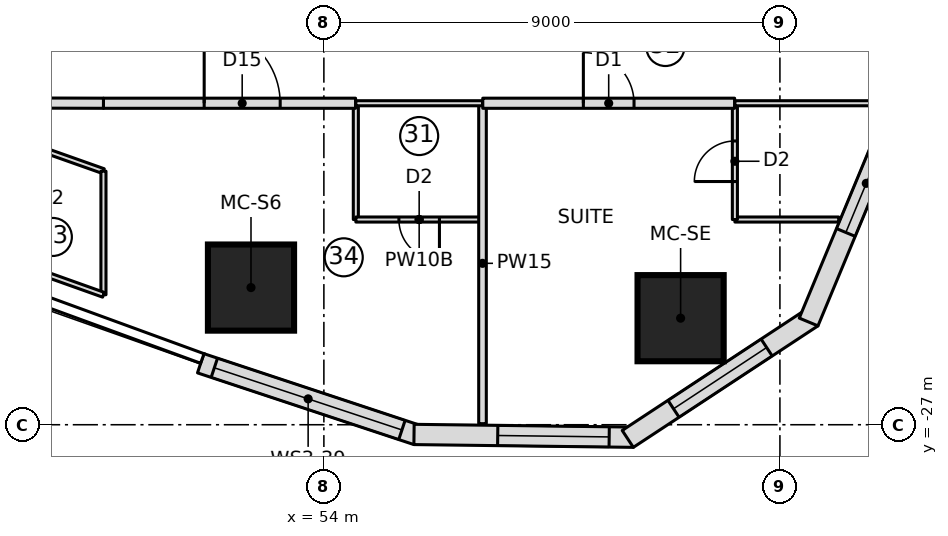
"""IFC4 building model, lengths in metres.
Left out: names, types, materials, properties, quantities, classifications, styles, units other than length and angle.
Written with IfcOpenShell. Run it as: python <this file> out.ifc"""

import sys

from ifc_helpers import new_model, si_unit, direction, frame, frame_2d, origin, origin_2d, place, context, subcontext, project, spatial, polyline, rectangle, outline, extrude, element, fill, save


model = new_model("IFC4")
c1 = context("Model", 3, precision=1e-05, world=origin(), true_north=direction((0.0, 1.0)))
c2 = subcontext(c1, "Body", "Model", "MODEL_VIEW")
j1 = project(units=[si_unit("LENGTHUNIT", "METRE"), si_unit("PLANEANGLEUNIT", "RADIAN")], contexts=[c1])
p1 = place(None, origin())
s1 = spatial("IfcSite", under=j1, at=p1, CompositionType="ELEMENT")
p2 = place(p1, origin())
s2 = spatial("IfcBuilding", under=s1, at=p2, CompositionType="ELEMENT")
p3 = place(p2, frame((0.0, 0.0, 113.3)))
s3 = spatial("IfcBuildingStorey", under=s2, at=p3, CompositionType="ELEMENT", Elevation=113.3)
for number, where, z_axis, x_axis in (
    (1, (52.562, -24.293, 0.0), (0.0, 0.0, 1.0), (1.0, 0.0, 0.0)),
    (2, (61.04, -24.897, 0.0), (0.0, 0.0, 1.0), (1.0, 0.0, 0.0)),
):
    element("IfcColumn", number, at=place(p3, frame(where, z_axis=z_axis, x_axis=x_axis)), inside=s3, PredefinedType="COLUMN", context=c2, shape_type="SweptSolid", body=[
        extrude(rectangle(XDim=1.7, YDim=1.7, at=origin_2d()), origin(), (0.0, 0.0, 1.0), 3.55),
    ])
p4 = place(p3, frame((51.569, -25.787, 0.0), z_axis=(0.0, 0.0, 1.0), x_axis=(0.94925004851, -0.314522408429, 0.0)))
e3 = element("IfcWall", 3, at=p4, inside=s3, PredefinedType="NOTDEFINED", context=c2, shape_type="SweptSolid", body=[
    extrude(outline(polyline([(0.0, -0.2), (4.499, -0.2), (4.437, 0.2), (0.0, 0.2), (0.0, -0.2)])), origin(), (0.0, 0.0, 1.0), 3.25),
])
p5 = place(p4, frame((0.284, 0.0, 0.9)))
e4 = element("IfcOpeningElement", 4, at=p5, cuts=e3, PredefinedType="OPENING", context=c2, shape_type="SweptSolid", body=[
    extrude(rectangle(XDim=3.9, YDim=1.8, at=frame_2d((1.95, 0.9))), frame((0.0, 0.21, 0.0), z_axis=(0.0, -1.0, 0.0), x_axis=(1.0, 0.0, 0.0)), (0.0, 0.0, 1.0), 0.42),
])
p6 = place(p3, frame((55.81, -27.192, 0.0), z_axis=(0.0, 0.0, 1.0), x_axis=(0.999919718849, -0.012671063772, 0.0)))
e5 = element("IfcWall", 5, at=p6, inside=s3, PredefinedType="NOTDEFINED", context=c2, shape_type="SweptSolid", body=[
    extrude(outline(polyline([(-0.031, -0.2), (4.3, -0.2), (4.177, 0.2), (0.031, 0.2), (-0.031, -0.2)])), origin(), (0.0, 0.0, 1.0), 3.25),
])
p7 = place(p6, frame((1.621, 0.0, 0.6)))
e6 = element("IfcOpeningElement", 6, at=p7, cuts=e5, PredefinedType="OPENING", context=c2, shape_type="SweptSolid", body=[
    extrude(outline(polyline([(0.0, 1.35), (0.084, 1.771), (0.322, 2.128), (0.679, 2.366), (1.1, 2.45), (1.521, 2.366), (1.878, 2.128), (2.116, 1.771), (2.2, 1.35), (2.2, 1.1), (2.116, 0.679), (1.878, 0.322), (1.521, 0.084), (1.1, 0.0), (0.679, 0.084), (0.322, 0.322), (0.084, 0.679), (0.0, 1.1), (0.0, 1.35)])), frame((0.0, 0.21, 0.0), z_axis=(0.0, -1.0, 0.0), x_axis=(1.0, 0.0, 0.0)), (0.0, 0.0, 1.0), 0.42),
])
p8 = place(p3, frame((60.049, -27.246, 0.0), z_axis=(0.0, 0.0, 1.0), x_axis=(0.835340523653, 0.549732852887, 0.0)))
e7 = element("IfcWall", 7, at=p8, inside=s3, PredefinedType="NOTDEFINED", context=c2, shape_type="SweptSolid", body=[
    extrude(outline(polyline([(-0.061, -0.2), (4.3, -0.2), (4.178, 0.2), (0.061, 0.2), (-0.061, -0.2)])), origin(), (0.0, 0.0, 1.0), 3.25),
])
p9 = place(p8, frame((1.02, 0.0, 0.6)))
e8 = element("IfcOpeningElement", 8, at=p9, cuts=e7, PredefinedType="OPENING", context=c2, shape_type="SweptSolid", body=[
    extrude(outline(polyline([(0.0, 1.35), (0.084, 1.771), (0.322, 2.128), (0.679, 2.366), (1.1, 2.45), (1.521, 2.366), (1.878, 2.128), (2.116, 1.771), (2.2, 1.35), (2.2, 1.1), (2.116, 0.679), (1.878, 0.322), (1.521, 0.084), (1.1, 0.0), (0.679, 0.084), (0.322, 0.322), (0.084, 0.679), (0.0, 1.1), (0.0, 1.35)])), frame((0.0, 0.21, 0.0), z_axis=(0.0, -1.0, 0.0), x_axis=(1.0, 0.0, 0.0)), (0.0, 0.0, 1.0), 0.42),
])
p10 = place(p3, frame((63.59, -24.916, 0.0), z_axis=(0.0, 0.0, 1.0), x_axis=(0.383997751971, 0.923334027577, 0.0)))
e9 = element("IfcWall", 9, at=p10, inside=s3, PredefinedType="NOTDEFINED", context=c2, shape_type="SweptSolid", body=[
    extrude(outline(polyline([(-0.061, -0.2), (4.27, -0.2), (4.208, 0.2), (0.061, 0.2), (-0.061, -0.2)])), origin(), (0.0, 0.0, 1.0), 3.25),
])
p11 = place(p10, frame((1.852, 0.0, 0.6)))
e10 = element("IfcOpeningElement", 10, at=p11, cuts=e9, PredefinedType="OPENING", context=c2, shape_type="SweptSolid", body=[
    extrude(outline(polyline([(0.0, 1.4), (0.08, 1.802), (0.308, 2.142), (0.648, 2.37), (1.05, 2.45), (1.452, 2.37), (1.792, 2.142), (2.02, 1.802), (2.1, 1.4), (2.1, 1.05), (2.02, 0.648), (1.792, 0.308), (1.452, 0.08), (1.05, 0.0), (0.648, 0.08), (0.308, 0.308), (0.08, 0.648), (0.0, 1.05), (0.0, 1.4)])), frame((0.0, 0.21, 0.0), z_axis=(0.0, -1.0, 0.0), x_axis=(1.0, 0.0, 0.0)), (0.0, 0.0, 1.0), 0.42),
])
p12 = place(p3, frame((54.631, -22.95, 0.0), z_axis=(0.0, 0.0, 1.0), x_axis=(0.0, 1.0, 0.0)))
e11 = element("IfcWall", 11, at=p12, inside=s3, PredefinedType="PARTITIONING", context=c2, shape_type="SweptSolid", body=[
    extrude(rectangle(XDim=2.3, YDim=0.1, at=frame_2d((1.15, 0.0))), origin(), (0.0, 0.0, 1.0), 3.25),
])
p13 = place(p3, frame((57.131, -22.95, 0.0), z_axis=(0.0, 0.0, 1.0), x_axis=(-1.0, 0.0, 0.0)))
e12 = element("IfcWall", 12, at=p13, inside=s3, PredefinedType="PARTITIONING", context=c2, shape_type="SweptSolid", body=[
    extrude(rectangle(XDim=2.5, YDim=0.1, at=frame_2d((1.25, 0.0))), origin(), (0.0, 0.0, 1.0), 3.25),
])
p14 = place(p13, frame((0.85, 0.0, 0.0)))
e13 = element("IfcOpeningElement", 13, at=p14, cuts=e12, PredefinedType="OPENING", context=c2, shape_type="SweptSolid", body=[
    extrude(rectangle(XDim=0.8, YDim=2.1, at=frame_2d((0.4, 1.05))), frame((0.0, 0.06, 0.0), z_axis=(0.0, -1.0, 0.0), x_axis=(1.0, 0.0, 0.0)), (0.0, 0.0, 1.0), 0.12),
])
p15 = place(p3, frame((64.16, -22.95, 0.0), z_axis=(0.0, 0.0, 1.0), x_axis=(-1.0, 0.0, 0.0)))
e14 = element("IfcWall", 14, at=p15, inside=s3, PredefinedType="PARTITIONING", context=c2, shape_type="SweptSolid", body=[
    extrude(rectangle(XDim=2.049, YDim=0.1, at=frame_2d((1.025, 0.0))), origin(), (0.0, 0.0, 1.0), 3.25),
])
p16 = place(p3, frame((62.111, -22.95, 0.0), z_axis=(0.0, 0.0, 1.0), x_axis=(0.0, 1.0, 0.0)))
e15 = element("IfcWall", 15, at=p16, inside=s3, PredefinedType="PARTITIONING", context=c2, shape_type="SweptSolid", body=[
    extrude(rectangle(XDim=2.3, YDim=0.1, at=frame_2d((1.15, 0.0))), origin(), (0.0, 0.0, 1.0), 3.25),
])
p17 = place(p16, frame((0.75, 0.0, 0.0)))
e16 = element("IfcOpeningElement", 16, at=p17, cuts=e15, PredefinedType="OPENING", context=c2, shape_type="SweptSolid", body=[
    extrude(rectangle(XDim=0.8, YDim=2.1, at=frame_2d((0.4, 1.05))), frame((0.0, 0.06, 0.0), z_axis=(0.0, -1.0, 0.0), x_axis=(1.0, 0.0, 0.0)), (0.0, 0.0, 1.0), 0.12),
])
p18 = place(p3, frame((57.131, -26.979, 0.0), z_axis=(0.0, 0.0, 1.0), x_axis=(0.0, 1.0, 0.0)))
e17 = element("IfcWall", 17, at=p18, inside=s3, PredefinedType="PARTITIONING", context=c2, shape_type="SweptSolid", body=[
    extrude(rectangle(XDim=6.329, YDim=0.15, at=frame_2d((3.165, 0.0))), origin(), (0.0, 0.0, 1.0), 3.25),
])
p19 = place(p3, frame((48.363, -21.54, 0.0), z_axis=(0.0, 0.0, 1.0), x_axis=(0.942692856107, -0.333661773425, 0.0)))
e18 = element("IfcWall", 18, at=p19, inside=s3, PredefinedType="PARTITIONING", context=c2, shape_type="SweptSolid", body=[
    extrude(rectangle(XDim=1.365, YDim=0.1, at=frame_2d((0.683, 0.0))), origin(), (0.0, 0.0, 1.0), 3.25),
])
p20 = place(p3, frame((49.65, -20.655, 0.0), z_axis=(0.0, 0.0, 1.0), x_axis=(1.0, 0.0, 0.0)))
e19 = element("IfcWall", 19, at=p20, inside=s3, PredefinedType="PARTITIONING", context=c2, shape_type="SweptSolid", body=[
    extrude(rectangle(XDim=4.976, YDim=0.2, at=frame_2d((2.488, 0.0))), origin(), (0.0, 0.0, 1.0), 3.25),
])
p21 = place(p20, frame((1.988, 0.0, 0.0)))
e20 = element("IfcOpeningElement", 20, at=p21, cuts=e19, PredefinedType="OPENING", context=c2, shape_type="SweptSolid", body=[
    extrude(rectangle(XDim=1.5, YDim=2.1, at=frame_2d((0.75, 1.05))), frame((0.0, 0.11, 0.0), z_axis=(0.0, -1.0, 0.0), x_axis=(1.0, 0.0, 0.0)), (0.0, 0.0, 1.0), 0.22),
])
p22 = place(p3, frame((57.135, -20.655, 0.0), z_axis=(0.0, 0.0, 1.0), x_axis=(1.0, 0.0, 0.0)))
e21 = element("IfcWall", 21, at=p22, inside=s3, PredefinedType="PARTITIONING", context=c2, shape_type="SweptSolid", body=[
    extrude(rectangle(XDim=4.971, YDim=0.2, at=frame_2d((2.485, 0.0))), origin(), (0.0, 0.0, 1.0), 3.25),
])
p23 = place(p22, frame((1.985, 0.0, 0.0)))
e22 = element("IfcOpeningElement", 22, at=p23, cuts=e21, PredefinedType="OPENING", context=c2, shape_type="SweptSolid", body=[
    extrude(rectangle(XDim=1.0, YDim=2.1, at=frame_2d((0.5, 1.05))), frame((0.0, 0.11, 0.0), z_axis=(0.0, -1.0, 0.0), x_axis=(1.0, 0.0, 0.0)), (0.0, 0.0, 1.0), 0.22),
])
p24 = place(p3, frame((54.631, -20.655, 0.0), z_axis=(0.0, 0.0, 1.0), x_axis=(1.0, 0.0, 0.0)))
e23 = element("IfcWall", 23, at=p24, inside=s3, PredefinedType="PARTITIONING", context=c2, shape_type="SweptSolid", body=[
    extrude(rectangle(XDim=2.5, YDim=0.1, at=frame_2d((1.25, 0.0))), origin(), (0.0, 0.0, 1.0), 3.25),
])
p25 = place(p3, frame((62.111, -20.655, 0.0), z_axis=(0.0, 0.0, 1.0), x_axis=(1.0, 0.0, 0.0)))
e24 = element("IfcWall", 24, at=p25, inside=s3, PredefinedType="PARTITIONING", context=c2, shape_type="SweptSolid", body=[
    extrude(rectangle(XDim=2.906, YDim=0.1, at=frame_2d((1.453, 0.0))), origin(), (0.0, 0.0, 1.0), 3.25),
])
p26 = place(p3, frame((49.65, -21.996, 0.0), z_axis=(0.0, 0.0, 1.0), x_axis=(0.0, -1.0, 0.0)))
e25 = element("IfcWall", 25, at=p26, inside=s3, PredefinedType="PARTITIONING", context=c2, shape_type="SweptSolid", body=[
    extrude(rectangle(XDim=2.439, YDim=0.1, at=frame_2d((1.22, 0.0))), origin(), (0.0, 0.0, 1.0), 3.25),
])
p27 = place(p3, frame((49.65, -24.435, 0.0), z_axis=(0.0, 0.0, 1.0), x_axis=(-0.941933231826, 0.335800218555, 0.0)))
e26 = element("IfcWall", 26, at=p27, inside=s3, PredefinedType="PARTITIONING", context=c2, shape_type="SweptSolid", body=[
    extrude(rectangle(XDim=2.51, YDim=0.1, at=frame_2d((1.255, 0.0))), origin(), (0.0, 0.0, 1.0), 3.25),
])
p28 = place(p3, frame((48.145, -20.651, 0.0), z_axis=(0.0, 0.0, 1.0), x_axis=(0.999996196879, -0.002757938895, 0.0)))
e27 = element("IfcWall", 27, at=p28, inside=s3, PredefinedType="PARTITIONING", context=c2, shape_type="SweptSolid", body=[
    extrude(rectangle(XDim=1.505, YDim=0.2, at=frame_2d((0.752, 0.0))), origin(), (0.0, 0.0, 1.0), 3.25),
])
p29 = place(p5, origin())
e28 = element("IfcWindow", 28, at=p29, inside=s3, PartitioningType="SINGLE_PANEL", PredefinedType="WINDOW", context=c2, shape_type="SweptSolid", body=[
    extrude(rectangle(XDim=3.9, YDim=1.8, at=frame_2d((1.95, 0.9))), frame((0.0, 0.17, 0.0), z_axis=(0.0, -1.0, 0.0), x_axis=(1.0, 0.0, 0.0)), (0.0, 0.0, 1.0), 0.06),
])
fill(e4, e28)
p30 = place(p7, origin())
e29 = element("IfcWindow", 29, at=p30, inside=s3, PartitioningType="SINGLE_PANEL", PredefinedType="WINDOW", context=c2, shape_type="SweptSolid", body=[
    extrude(outline(polyline([(0.0, 1.35), (0.084, 1.771), (0.322, 2.128), (0.679, 2.366), (1.1, 2.45), (1.521, 2.366), (1.878, 2.128), (2.116, 1.771), (2.2, 1.35), (2.2, 1.1), (2.116, 0.679), (1.878, 0.322), (1.521, 0.084), (1.1, 0.0), (0.679, 0.084), (0.322, 0.322), (0.084, 0.679), (0.0, 1.1), (0.0, 1.35)])), frame((0.0, 0.17, 0.0), z_axis=(0.0, -1.0, 0.0), x_axis=(1.0, 0.0, 0.0)), (0.0, 0.0, 1.0), 0.06),
])
fill(e6, e29)
p31 = place(p9, origin())
e30 = element("IfcWindow", 30, at=p31, inside=s3, PartitioningType="SINGLE_PANEL", PredefinedType="WINDOW", context=c2, shape_type="SweptSolid", body=[
    extrude(outline(polyline([(0.0, 1.35), (0.084, 1.771), (0.322, 2.128), (0.679, 2.366), (1.1, 2.45), (1.521, 2.366), (1.878, 2.128), (2.116, 1.771), (2.2, 1.35), (2.2, 1.1), (2.116, 0.679), (1.878, 0.322), (1.521, 0.084), (1.1, 0.0), (0.679, 0.084), (0.322, 0.322), (0.084, 0.679), (0.0, 1.1), (0.0, 1.35)])), frame((0.0, 0.17, 0.0), z_axis=(0.0, -1.0, 0.0), x_axis=(1.0, 0.0, 0.0)), (0.0, 0.0, 1.0), 0.06),
])
fill(e8, e30)
p32 = place(p11, origin())
e31 = element("IfcWindow", 31, at=p32, inside=s3, PartitioningType="SINGLE_PANEL", PredefinedType="WINDOW", context=c2, shape_type="SweptSolid", body=[
    extrude(outline(polyline([(0.0, 1.4), (0.08, 1.802), (0.308, 2.142), (0.648, 2.37), (1.05, 2.45), (1.452, 2.37), (1.792, 2.142), (2.02, 1.802), (2.1, 1.4), (2.1, 1.05), (2.02, 0.648), (1.792, 0.308), (1.452, 0.08), (1.05, 0.0), (0.648, 0.08), (0.308, 0.308), (0.08, 0.648), (0.0, 1.05), (0.0, 1.4)])), frame((0.0, 0.17, 0.0), z_axis=(0.0, -1.0, 0.0), x_axis=(1.0, 0.0, 0.0)), (0.0, 0.0, 1.0), 0.06),
])
fill(e10, e31)
p33 = place(p14, origin())
e32 = element("IfcDoor", 32, at=p33, inside=s3, OperationType="SINGLE_SWING_LEFT", PredefinedType="DOOR", context=c2, shape_type="SweptSolid", body=[
    extrude(rectangle(XDim=0.8, YDim=2.1, at=frame_2d((0.4, 1.05))), frame((0.0, 0.025, 0.0), z_axis=(0.0, -1.0, 0.0), x_axis=(1.0, 0.0, 0.0)), (0.0, 0.0, 1.0), 0.05),
])
fill(e13, e32)
p34 = place(p17, origin())
e33 = element("IfcDoor", 33, at=p34, inside=s3, OperationType="SINGLE_SWING_LEFT", PredefinedType="DOOR", context=c2, shape_type="SweptSolid", body=[
    extrude(rectangle(XDim=0.8, YDim=2.1, at=frame_2d((0.4, 1.05))), frame((0.0, 0.025, 0.0), z_axis=(0.0, -1.0, 0.0), x_axis=(1.0, 0.0, 0.0)), (0.0, 0.0, 1.0), 0.05),
])
fill(e16, e33)
p35 = place(p21, origin())
e34 = element("IfcDoor", 34, at=p35, inside=s3, OperationType="DOUBLE_DOOR_SINGLE_SWING", PredefinedType="DOOR", context=c2, shape_type="SweptSolid", body=[
    extrude(rectangle(XDim=1.5, YDim=2.1, at=frame_2d((0.75, 1.05))), frame((0.0, 0.025, 0.0), z_axis=(0.0, -1.0, 0.0), x_axis=(1.0, 0.0, 0.0)), (0.0, 0.0, 1.0), 0.05),
])
fill(e20, e34)
p36 = place(p23, origin())
e35 = element("IfcDoor", 35, at=p36, inside=s3, OperationType="SINGLE_SWING_LEFT", PredefinedType="DOOR", context=c2, shape_type="SweptSolid", body=[
    extrude(rectangle(XDim=1.0, YDim=2.1, at=frame_2d((0.5, 1.05))), frame((0.0, 0.025, 0.0), z_axis=(0.0, -1.0, 0.0), x_axis=(1.0, 0.0, 0.0)), (0.0, 0.0, 1.0), 0.05),
])
fill(e22, e35)
save(model, sys.argv[1])
